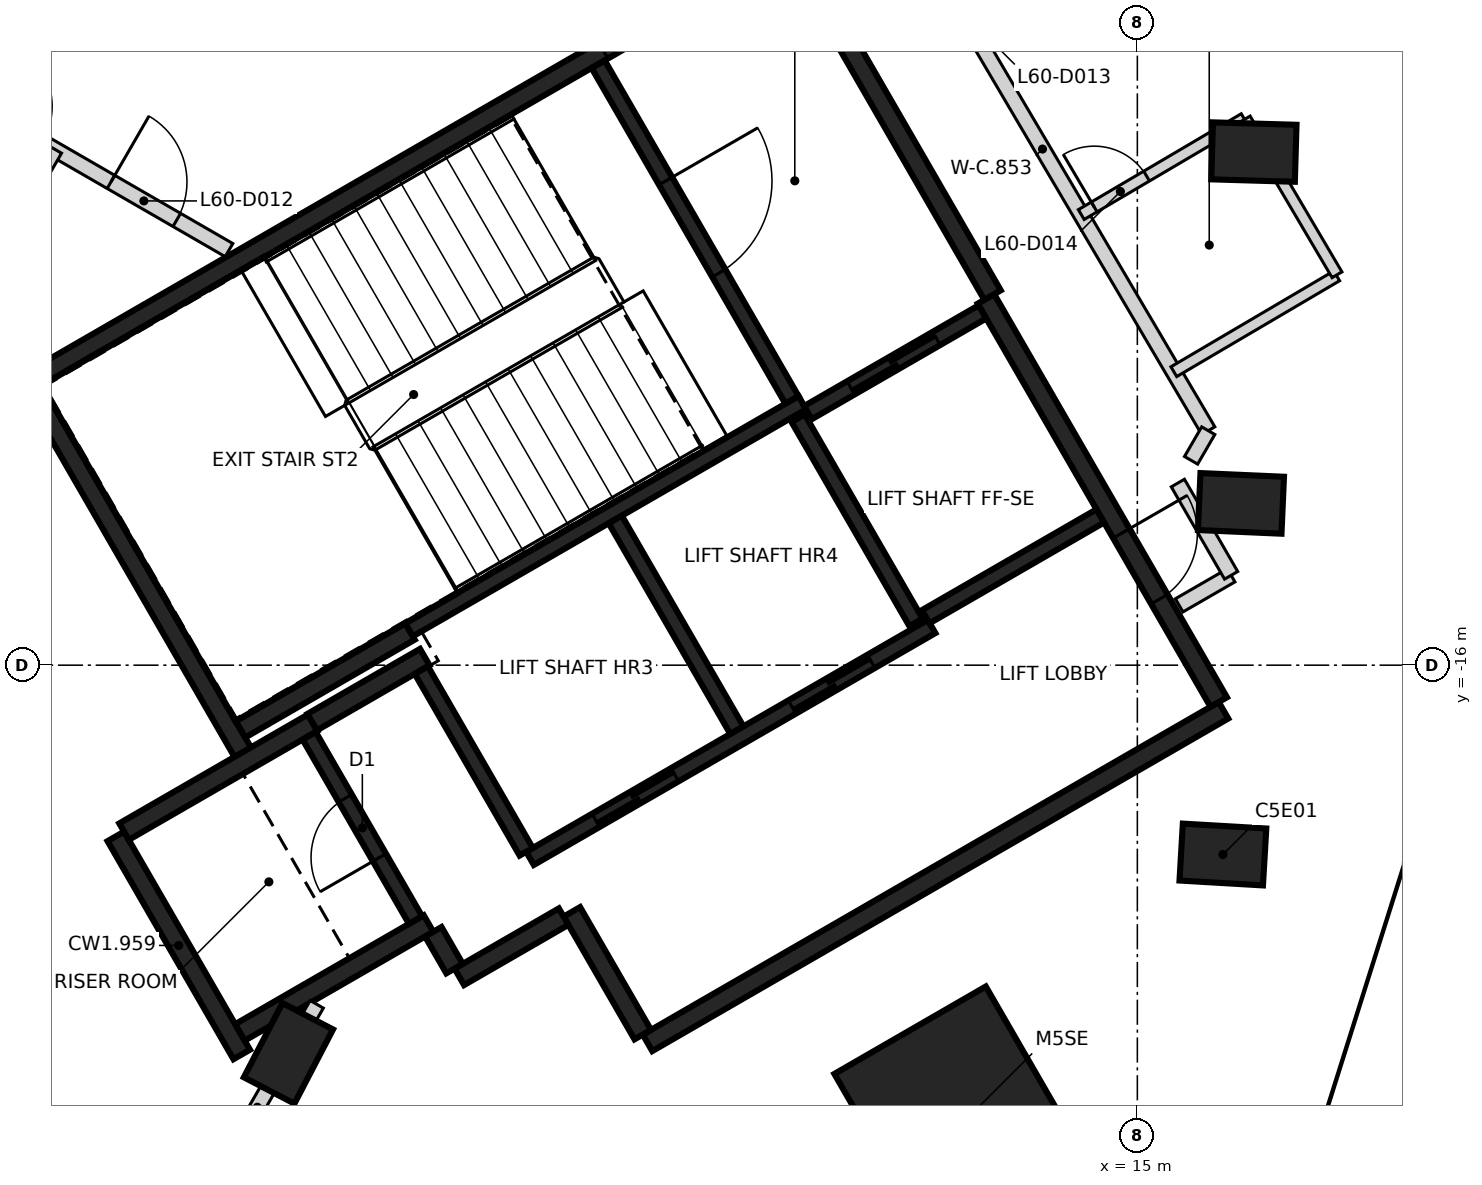
"""IFC4 building model, lengths in metres.
Left out: names, types, materials, properties, quantities, classifications, styles, units other than length and angle.
Written with IfcOpenShell. Run it as: python <this file> out.ifc"""

import sys

from ifc_helpers import new_model, si_unit, direction, frame, frame_2d, origin, origin_2d, place, context, subcontext, project, spatial, rectangle, extrude, element, fill, save


model = new_model("IFC4")
c1 = context("Model", 3, precision=1e-05, world=origin(), true_north=direction((0.0, 1.0)))
c2 = subcontext(c1, "Body", "Model", "MODEL_VIEW")
j1 = project(units=[si_unit("LENGTHUNIT", "METRE"), si_unit("PLANEANGLEUNIT", "RADIAN")], contexts=[c1])
p1 = place(None, origin())
s1 = spatial("IfcSite", under=j1, at=p1, CompositionType="ELEMENT")
p2 = place(p1, origin())
s2 = spatial("IfcBuilding", under=s1, at=p2, CompositionType="ELEMENT")
p3 = place(p2, frame((0.0, 0.0, 239.4)))
s3 = spatial("IfcBuildingStorey", under=s2, at=p3, CompositionType="ELEMENT", Elevation=239.4)
for number, where, z_axis, x_axis in (
    (1, (16.125, -18.491, -0.35), (0.0, 0.0, 1.0), (-0.998, 0.058, 0.0)),
    (2, (16.363, -13.872, -0.35), (0.0, 0.0, 1.0), (-0.999, 0.044, 0.0)),
    (3, (16.533, -9.25, -0.35), (0.0, 0.0, 1.0), (-1.0, 0.029, 0.0)),
    (4, (3.832, -21.107, -0.35), (0.0, 0.0, 1.0), (0.461, 0.887, 0.0)),
):
    element("IfcColumn", number, at=place(p3, frame(where, z_axis=z_axis, x_axis=x_axis)), inside=s3, PredefinedType="COLUMN", context=c2, shape_type="SweptSolid", body=[
        extrude(rectangle(XDim=1.1, YDim=0.75, at=origin_2d()), origin(), (0.0, 0.0, 1.0), 3.6),
    ])
p4 = place(p3, frame((12.71, -22.015, -0.35), z_axis=(0.0, 0.0, 1.0), x_axis=(-0.5, 0.866025403784, 0.0)))
e5 = element("IfcColumn", 5, at=p4, inside=s3, PredefinedType="COLUMN", context=c2, shape_type="SweptSolid", body=[
    extrude(rectangle(XDim=2.8, YDim=2.3, at=origin_2d()), origin(), (0.0, 0.0, 1.0), 3.6),
])
p5 = place(p3, frame((0.417, -12.273, 0.0), z_axis=(0.0, 0.0, 1.0), x_axis=(0.866021906294, 0.500006057782, 0.0)))
e6 = element("IfcWall", 6, at=p5, inside=s3, PredefinedType="SHEAR", context=c2, shape_type="SweptSolid", body=[
    extrude(rectangle(XDim=11.55, YDim=0.25, at=frame_2d((5.775, 0.0))), origin(), (0.0, 0.0, 1.0), 3.25),
])
p6 = place(p5, frame((10.025, 0.0, 0.0)))
e7 = element("IfcOpeningElement", 7, at=p6, cuts=e6, PredefinedType="OPENING", context=c2, shape_type="SweptSolid", body=[
    extrude(rectangle(XDim=1.2, YDim=2.1, at=frame_2d((0.6, 1.05))), frame((0.0, 0.135, 0.0), z_axis=(0.0, -1.0, 0.0), x_axis=(1.0, 0.0, 0.0)), (0.0, 0.0, 1.0), 0.27),
])
p7 = place(p5, frame((8.725, 0.0, 0.0)))
e8 = element("IfcOpeningElement", 8, at=p7, cuts=e6, PredefinedType="OPENING", context=c2, shape_type="SweptSolid", body=[
    extrude(rectangle(XDim=1.2, YDim=2.1, at=frame_2d((0.6, 1.05))), frame((0.0, 0.135, 0.0), z_axis=(0.0, -1.0, 0.0), x_axis=(1.0, 0.0, 0.0)), (0.0, 0.0, 1.0), 0.27),
])
p8 = place(p3, frame((16.133, -16.594, 0.0), z_axis=(0.0, 0.0, 1.0), x_axis=(-0.866022959057, -0.500004234368, 0.0)))
e9 = element("IfcWall", 9, at=p8, inside=s3, PredefinedType="SHEAR", context=c2, shape_type="SweptSolid", body=[
    extrude(rectangle(XDim=8.75, YDim=0.25, at=frame_2d((4.375, 0.0))), origin(), (0.0, 0.0, 1.0), 3.25),
])
p9 = place(p3, frame((13.008, -11.181, 0.0), z_axis=(0.0, 0.0, 1.0), x_axis=(0.500001955336, -0.866024274868, 0.0)))
e10 = element("IfcWall", 10, at=p9, inside=s3, PredefinedType="SHEAR", context=c2, shape_type="SweptSolid", body=[
    extrude(rectangle(XDim=6.125, YDim=0.25, at=frame_2d((3.062, 0.0))), origin(), (0.0, 0.0, 1.0), 3.25),
])
p10 = place(p9, frame((3.563, 0.0, 0.0)))
e11 = element("IfcOpeningElement", 11, at=p10, cuts=e10, PredefinedType="OPENING", context=c2, shape_type="SweptSolid", body=[
    extrude(rectangle(XDim=1.0, YDim=2.1, at=frame_2d((0.5, 1.05))), frame((0.0, 0.135, 0.0), z_axis=(0.0, -1.0, 0.0), x_axis=(1.0, 0.0, 0.0)), (0.0, 0.0, 1.0), 0.27),
])
p11 = place(p3, frame((3.235, -17.153, 0.0), z_axis=(0.0, 0.0, 1.0), x_axis=(-0.500008851346, 0.866020293397, 0.0)))
e12 = element("IfcWall", 12, at=p11, inside=s3, PredefinedType="SHEAR", context=c2, shape_type="SweptSolid", body=[
    extrude(rectangle(XDim=5.51, YDim=0.25, at=frame_2d((2.755, 0.0))), origin(), (0.0, 0.0, 1.0), 3.25),
])
p12 = place(p3, frame((10.483, -6.606, 0.0), z_axis=(0.0, 0.0, 1.0), x_axis=(0.49999885962, -0.866026062182, 0.0)))
e13 = element("IfcWall", 13, at=p12, inside=s3, PredefinedType="SHEAR", context=c2, shape_type="SweptSolid", body=[
    extrude(rectangle(XDim=5.225, YDim=0.25, at=frame_2d((2.612, 0.0))), origin(), (0.0, 0.0, 1.0), 3.25),
])
p13 = place(p3, frame((3.217, -21.122, 0.0), z_axis=(0.0, 0.0, 1.0), x_axis=(-0.499998874531, 0.866026053573, 0.0)))
e14 = element("IfcWall", 14, at=p13, inside=s3, PredefinedType="SHEAR", context=c2, shape_type="SweptSolid", body=[
    extrude(rectangle(XDim=3.313, YDim=0.25, at=frame_2d((1.656, 0.0))), origin(), (0.0, 0.0, 1.0), 3.25),
])
p14 = place(p3, frame((1.669, -18.19, 0.0), z_axis=(0.0, 0.0, 1.0), x_axis=(0.866042235819, 0.499970844928, 0.0)))
e15 = element("IfcWall", 15, at=p14, inside=s3, PredefinedType="SHEAR", context=c2, shape_type="SweptSolid", body=[
    extrude(rectangle(XDim=2.865, YDim=0.25, at=frame_2d((1.432, 0.0))), origin(), (0.0, 0.0, 1.0), 3.25),
])
p15 = place(p3, frame((5.675, -19.399, 0.0), z_axis=(0.0, 0.0, 1.0), x_axis=(-0.866026637627, -0.499997862916, 0.0)))
e16 = element("IfcWall", 16, at=p15, inside=s3, PredefinedType="SHEAR", context=c2, shape_type="SweptSolid", body=[
    extrude(rectangle(XDim=2.865, YDim=0.25, at=frame_2d((1.432, 0.0))), origin(), (0.0, 0.0, 1.0), 3.25),
])
p16 = place(p3, frame((5.431, -15.556, 0.0), z_axis=(0.0, 0.0, 1.0), x_axis=(-0.866022940537, -0.500004266446, 0.0)))
e17 = element("IfcWall", 17, at=p16, inside=s3, PredefinedType="SHEAR", context=c2, shape_type="SweptSolid", body=[
    extrude(rectangle(XDim=2.575, YDim=0.25, at=frame_2d((1.287, 0.0))), origin(), (0.0, 0.0, 1.0), 3.25),
])
p17 = place(p3, frame((8.493, -20.86, 0.0), z_axis=(0.0, 0.0, 1.0), x_axis=(-0.500039802285, 0.866002422705, 0.0)))
e18 = element("IfcWall", 18, at=p17, inside=s3, PredefinedType="SHEAR", context=c2, shape_type="SweptSolid", body=[
    extrude(rectangle(XDim=1.865, YDim=0.25, at=frame_2d((0.932, 0.0))), origin(), (0.0, 0.0, 1.0), 3.25),
])
p18 = place(p3, frame((4.145, -16.749, 0.0), z_axis=(0.0, 0.0, 1.0), x_axis=(0.866038183914, 0.499977863513, 0.0)))
e19 = element("IfcWall", 19, at=p18, inside=s3, PredefinedType="SHEAR", context=c2, shape_type="SweptSolid", body=[
    extrude(rectangle(XDim=1.71, YDim=0.25, at=frame_2d((0.855, 0.0))), origin(), (0.0, 0.0, 1.0), 3.25),
])
p19 = place(p3, frame((7.452, -19.308, 0.0), z_axis=(0.0, 0.0, 1.0), x_axis=(-0.866044474677, -0.49996696679, 0.0)))
e20 = element("IfcWall", 20, at=p19, inside=s3, PredefinedType="SHEAR", context=c2, shape_type="SweptSolid", body=[
    extrude(rectangle(XDim=1.584, YDim=0.25, at=frame_2d((0.792, 0.0))), origin(), (0.0, 0.0, 1.0), 3.25),
])
p20 = place(p3, frame((6.017, -19.992, 0.0), z_axis=(0.0, 0.0, 1.0), x_axis=(-0.500364886717, 0.865814633822, 0.0)))
e21 = element("IfcWall", 21, at=p20, inside=s3, PredefinedType="SHEAR", context=c2, shape_type="SweptSolid", body=[
    extrude(rectangle(XDim=0.559, YDim=0.25, at=frame_2d((0.28, 0.0))), origin(), (0.0, 0.0, 1.0), 3.25),
])
p21 = place(p3, frame((5.419, -15.534, 0.0), z_axis=(0.0, 0.0, 1.0), x_axis=(0.866029065029, 0.499993658486, 0.0)))
e22 = element("IfcWall", 22, at=p21, inside=s3, PredefinedType="SHEAR", context=c2, shape_type="SweptSolid", body=[
    extrude(rectangle(XDim=5.974, YDim=0.2, at=frame_2d((2.987, 0.0))), origin(), (0.0, 0.0, 1.0), 3.25),
])
p22 = place(p3, frame((7.01, -18.542, 0.0), z_axis=(0.0, 0.0, 1.0), x_axis=(0.866030299012, 0.499991521122, 0.0)))
e23 = element("IfcWall", 23, at=p22, inside=s3, PredefinedType="SHEAR", context=c2, shape_type="SweptSolid", body=[
    extrude(rectangle(XDim=6.1, YDim=0.2, at=frame_2d((3.05, 0.0))), origin(), (0.0, 0.0, 1.0), 3.25),
])
p23 = place(p22, frame((1.0, 0.0, 0.0)))
e24 = element("IfcOpeningElement", 24, at=p23, cuts=e23, PredefinedType="OPENING", context=c2, shape_type="SweptSolid", body=[
    extrude(rectangle(XDim=1.2, YDim=2.1, at=frame_2d((0.6, 1.05))), frame((0.0, 0.11, 0.0), z_axis=(0.0, -1.0, 0.0), x_axis=(1.0, 0.0, 0.0)), (0.0, 0.0, 1.0), 0.22),
])
p24 = place(p22, frame((3.982, 0.0, 0.0)))
e25 = element("IfcOpeningElement", 25, at=p24, cuts=e23, PredefinedType="OPENING", context=c2, shape_type="SweptSolid", body=[
    extrude(rectangle(XDim=1.2, YDim=2.1, at=frame_2d((0.6, 1.05))), frame((0.0, 0.11, 0.0), z_axis=(0.0, -1.0, 0.0), x_axis=(1.0, 0.0, 0.0)), (0.0, 0.0, 1.0), 0.22),
])
p25 = place(p3, frame((7.906, -8.094, 0.0), z_axis=(0.0, 0.0, 1.0), x_axis=(0.500027839223, -0.866009330205, 0.0)))
e26 = element("IfcWall", 26, at=p25, inside=s3, PredefinedType="SHEAR", context=c2, shape_type="SweptSolid", body=[
    extrude(rectangle(XDim=5.098, YDim=0.2, at=frame_2d((2.549, 0.0))), origin(), (0.0, 0.0, 1.0), 3.25),
])
p26 = place(p25, frame((1.774, 0.0, 0.0)))
e27 = element("IfcOpeningElement", 27, at=p26, cuts=e26, PredefinedType="OPENING", context=c2, shape_type="SweptSolid", body=[
    extrude(rectangle(XDim=1.4, YDim=2.1, at=frame_2d((0.7, 1.05))), frame((0.0, 0.11, 0.0), z_axis=(0.0, -1.0, 0.0), x_axis=(1.0, 0.0, 0.0)), (0.0, 0.0, 1.0), 0.22),
])
p27 = place(p3, frame((8.132, -14.084, 0.0), z_axis=(0.0, 0.0, 1.0), x_axis=(0.499997778408, -0.866026686418, 0.0)))
e28 = element("IfcWall", 28, at=p27, inside=s3, PredefinedType="SHEAR", context=c2, shape_type="SweptSolid", body=[
    extrude(rectangle(XDim=3.198, YDim=0.2, at=frame_2d((1.599, 0.0))), origin(), (0.0, 0.0, 1.0), 3.25),
])
p28 = place(p3, frame((5.503, -19.352, 0.0), z_axis=(0.0, 0.0, 1.0), x_axis=(-0.499986818241, 0.866033014143, 0.0)))
e29 = element("IfcWall", 29, at=p28, inside=s3, PredefinedType="SHEAR", context=c2, shape_type="SweptSolid", body=[
    extrude(rectangle(XDim=2.798, YDim=0.2, at=frame_2d((1.399, 0.0))), origin(), (0.0, 0.0, 1.0), 3.25),
])
p29 = place(p28, frame((0.949, 0.0, 0.0)))
e30 = element("IfcOpeningElement", 30, at=p29, cuts=e29, PredefinedType="OPENING", context=c2, shape_type="SweptSolid", body=[
    extrude(rectangle(XDim=0.9, YDim=2.1, at=frame_2d((0.45, 1.05))), frame((0.0, 0.11, 0.0), z_axis=(0.0, -1.0, 0.0), x_axis=(1.0, 0.0, 0.0)), (0.0, 0.0, 1.0), 0.22),
])
p30 = place(p3, frame((6.96, -18.455, 0.0), z_axis=(0.0, 0.0, 1.0), x_axis=(-0.499926705758, 0.866067716099, 0.0)))
e31 = element("IfcWall", 31, at=p30, inside=s3, PredefinedType="SHEAR", context=c2, shape_type="SweptSolid", body=[
    extrude(rectangle(XDim=2.759, YDim=0.2, at=frame_2d((1.38, 0.0))), origin(), (0.0, 0.0, 1.0), 3.25),
])
p31 = place(p3, frame((12.088, -15.437, 0.0), z_axis=(0.0, 0.0, 1.0), x_axis=(-0.500026960575, 0.86600983753, 0.0)))
e32 = element("IfcWall", 32, at=p31, inside=s3, PredefinedType="SHEAR", context=c2, shape_type="SweptSolid", body=[
    extrude(rectangle(XDim=3.1, YDim=0.2, at=frame_2d((1.55, 0.0))), origin(), (0.0, 0.0, 1.0), 3.25),
])
p32 = place(p3, frame((10.666, -12.678, 0.0), z_axis=(0.0, 0.0, 1.0), x_axis=(0.866018407898, 0.500012117035, 0.0)))
e33 = element("IfcWall", 33, at=p32, inside=s3, PredefinedType="SHEAR", context=c2, shape_type="SweptSolid", body=[
    extrude(rectangle(XDim=2.651, YDim=0.2, at=frame_2d((1.325, 0.0))), origin(), (0.0, 0.0, 1.0), 3.25),
])
p33 = place(p32, frame((0.652, 0.0, 0.0)))
e34 = element("IfcOpeningElement", 34, at=p33, cuts=e33, PredefinedType="OPENING", context=c2, shape_type="SweptSolid", body=[
    extrude(rectangle(XDim=1.3, YDim=2.1, at=frame_2d((0.65, 1.05))), frame((0.0, 0.11, 0.0), z_axis=(0.0, -1.0, 0.0), x_axis=(1.0, 0.0, 0.0)), (0.0, 0.0, 1.0), 0.22),
])
p34 = place(p3, frame((14.512, -14.037, 0.0), z_axis=(0.0, 0.0, 1.0), x_axis=(-0.866018407898, -0.500012117035, 0.0)))
e35 = element("IfcWall", 35, at=p34, inside=s3, PredefinedType="SHEAR", context=c2, shape_type="SweptSolid", body=[
    extrude(rectangle(XDim=2.651, YDim=0.2, at=frame_2d((1.325, 0.0))), origin(), (0.0, 0.0, 1.0), 3.25),
])
p35 = place(p3, frame((-8.153, -4.069, 0.0), z_axis=(0.0, 0.0, 1.0), x_axis=(0.865955522833, -0.500121017829, 0.0)))
e36 = element("IfcWall", 36, at=p35, inside=s3, PredefinedType="PARTITIONING", context=c2, shape_type="SweptSolid", body=[
    extrude(rectangle(XDim=12.937, YDim=0.2, at=frame_2d((6.469, 0.0))), origin(), (0.0, 0.0, 1.0), 3.25),
])
p36 = place(p35, frame((3.337, 0.0, 0.0)))
e37 = element("IfcOpeningElement", 37, at=p36, cuts=e36, PredefinedType="OPENING", context=c2, shape_type="SweptSolid", body=[
    extrude(rectangle(XDim=1.0, YDim=2.1, at=frame_2d((0.5, 1.05))), frame((0.0, 0.11, 0.0), z_axis=(0.0, -1.0, 0.0), x_axis=(1.0, 0.0, 0.0)), (0.0, 0.0, 1.0), 0.22),
])
p37 = place(p35, frame((9.153, 0.0, 0.0)))
e38 = element("IfcOpeningElement", 38, at=p37, cuts=e36, PredefinedType="OPENING", context=c2, shape_type="SweptSolid", body=[
    extrude(rectangle(XDim=0.95, YDim=2.1, at=frame_2d((0.475, 1.05))), frame((0.0, 0.11, 0.0), z_axis=(0.0, -1.0, 0.0), x_axis=(1.0, 0.0, 0.0)), (0.0, 0.0, 1.0), 0.22),
])
p38 = place(p35, frame((11.144, 0.0, 0.0)))
e39 = element("IfcOpeningElement", 39, at=p38, cuts=e36, PredefinedType="OPENING", context=c2, shape_type="SweptSolid", body=[
    extrude(rectangle(XDim=1.0, YDim=2.1, at=frame_2d((0.5, 1.05))), frame((0.0, 0.11, 0.0), z_axis=(0.0, -1.0, 0.0), x_axis=(1.0, 0.0, 0.0)), (0.0, 0.0, 1.0), 0.22),
])
p39 = place(p3, frame((11.571, -5.505, 0.0), z_axis=(0.0, 0.0, 1.0), x_axis=(0.507291838928, -0.861774326699, 0.0)))
e40 = element("IfcWall", 40, at=p39, inside=s3, PredefinedType="PARTITIONING", context=c2, shape_type="SweptSolid", body=[
    extrude(rectangle(XDim=8.599, YDim=0.2, at=frame_2d((4.299, 0.0))), origin(), (0.0, 0.0, 1.0), 3.25),
])
p40 = place(p39, frame((1.712, 0.0, 0.0)))
e41 = element("IfcOpeningElement", 41, at=p40, cuts=e40, PredefinedType="OPENING", context=c2, shape_type="SweptSolid", body=[
    extrude(rectangle(XDim=0.95, YDim=2.1, at=frame_2d((0.475, 1.05))), frame((0.0, 0.11, 0.0), z_axis=(0.0, -1.0, 0.0), x_axis=(1.0, 0.0, 0.0)), (0.0, 0.0, 1.0), 0.22),
])
p41 = place(p3, frame((15.55, -15.213, 0.0), z_axis=(0.0, 0.0, 1.0), x_axis=(0.865989998118, 0.500061319399, 0.0)))
e42 = element("IfcWall", 42, at=p41, inside=s3, PredefinedType="PARTITIONING", context=c2, shape_type="SweptSolid", body=[
    extrude(rectangle(XDim=0.79, YDim=0.2, at=frame_2d((0.395, 0.0))), origin(), (0.0, 0.0, 1.0), 2.35),
])
p42 = place(p3, frame((15.933, -12.915, 0.0), z_axis=(0.0, 0.0, 1.0), x_axis=(-0.502017930819, -0.864857211993, 0.0)))
e43 = element("IfcWall", 43, at=p42, inside=s3, PredefinedType="PARTITIONING", context=c2, shape_type="SweptSolid", body=[
    extrude(rectangle(XDim=0.451, YDim=0.2, at=frame_2d((0.226, 0.0))), origin(), (0.0, 0.0, 1.0), 3.25),
])
p43 = place(p3, frame((15.533, -13.604, 0.0), z_axis=(0.0, 0.0, 1.0), x_axis=(0.499978724804, -0.866037686676, 0.0)))
e44 = element("IfcWall", 44, at=p43, inside=s3, PredefinedType="PARTITIONING", context=c2, shape_type="SweptSolid", body=[
    extrude(rectangle(XDim=1.402, YDim=0.2, at=frame_2d((0.701, 0.0))), origin(), (0.0, 0.0, 1.0), 2.35),
])
p44 = place(p3, frame((-4.942, -19.089, 0.0), z_axis=(0.0, 0.0, 1.0), x_axis=(0.500021458202, 0.866013014531, 0.0)))
e45 = element("IfcWall", 45, at=p44, inside=s3, PredefinedType="PARTITIONING", context=c2, shape_type="SweptSolid", body=[
    extrude(rectangle(XDim=11.403, YDim=0.2, at=frame_2d((5.701, 0.0))), origin(), (0.0, 0.0, 1.0), 2.35),
])
p45 = place(p3, frame((2.64, -23.17, 0.0), z_axis=(0.0, 0.0, 1.0), x_axis=(0.500017489778, 0.866015305821, 0.0)))
e46 = element("IfcWall", 46, at=p45, inside=s3, PredefinedType="PARTITIONING", context=c2, shape_type="SweptSolid", body=[
    extrude(rectangle(XDim=3.128, YDim=0.2, at=frame_2d((1.564, 0.0))), origin(), (0.0, 0.0, 1.0), 3.25),
])
p46 = place(p3, frame((14.262, -10.072, 0.0), z_axis=(0.0, 0.0, 1.0), x_axis=(0.861699433364, 0.507419044322, 0.0)))
e47 = element("IfcWall", 47, at=p46, inside=s3, PredefinedType="PARTITIONING", context=c2, shape_type="SweptSolid", body=[
    extrude(rectangle(XDim=2.487, YDim=0.15, at=frame_2d((1.244, 0.0))), origin(), (0.0, 0.0, 1.0), 3.25),
])
p47 = place(p46, frame((0.198, 0.0, 0.0)))
e48 = element("IfcOpeningElement", 48, at=p47, cuts=e47, PredefinedType="OPENING", context=c2, shape_type="SweptSolid", body=[
    extrude(rectangle(XDim=0.8, YDim=2.1, at=frame_2d((0.4, 1.05))), frame((0.0, 0.085, 0.0), z_axis=(0.0, -1.0, 0.0), x_axis=(1.0, 0.0, 0.0)), (0.0, 0.0, 1.0), 0.17),
])
p48 = place(p3, frame((15.48, -12.139, 0.0), z_axis=(0.0, 0.0, 1.0), x_axis=(0.86187110735, 0.507127394562, 0.0)))
e49 = element("IfcWall", 49, at=p48, inside=s3, PredefinedType="PARTITIONING", context=c2, shape_type="SweptSolid", body=[
    extrude(rectangle(XDim=2.487, YDim=0.15, at=frame_2d((1.243, 0.0))), origin(), (0.0, 0.0, 1.0), 2.35),
])
p49 = place(p3, frame((16.419, -8.814, 0.0), z_axis=(0.0, 0.0, 1.0), x_axis=(0.507674628474, -0.861548879405, 0.0)))
e50 = element("IfcWall", 50, at=p49, inside=s3, PredefinedType="PARTITIONING", context=c2, shape_type="SweptSolid", body=[
    extrude(rectangle(XDim=2.379, YDim=0.15, at=frame_2d((1.19, 0.0))), origin(), (0.0, 0.0, 1.0), 3.25),
])
p50 = place(p33, origin())
e51 = element("IfcDoor", 51, at=p50, inside=s3, OperationType="SLIDING_TO_RIGHT", PredefinedType="DOOR", context=c2, shape_type="SweptSolid", body=[
    extrude(rectangle(XDim=1.3, YDim=2.1, at=frame_2d((0.65, 1.05))), frame((0.0, 0.025, 0.0), z_axis=(0.0, -1.0, 0.0), x_axis=(1.0, 0.0, 0.0)), (0.0, 0.0, 1.0), 0.05),
])
fill(e34, e51)
p51 = place(p23, origin())
e52 = element("IfcDoor", 52, at=p51, inside=s3, OperationType="DOUBLE_DOOR_SLIDING", PredefinedType="DOOR", context=c2, shape_type="SweptSolid", body=[
    extrude(rectangle(XDim=1.2, YDim=2.1, at=frame_2d((0.6, 1.05))), frame((0.0, 0.025, 0.0), z_axis=(0.0, -1.0, 0.0), x_axis=(1.0, 0.0, 0.0)), (0.0, 0.0, 1.0), 0.05),
])
fill(e24, e52)
p52 = place(p24, origin())
e53 = element("IfcDoor", 53, at=p52, inside=s3, OperationType="DOUBLE_DOOR_SLIDING", PredefinedType="DOOR", context=c2, shape_type="SweptSolid", body=[
    extrude(rectangle(XDim=1.2, YDim=2.1, at=frame_2d((0.6, 1.05))), frame((0.0, 0.025, 0.0), z_axis=(0.0, -1.0, 0.0), x_axis=(1.0, 0.0, 0.0)), (0.0, 0.0, 1.0), 0.05),
])
fill(e25, e53)
p53 = place(p10, origin())
e54 = element("IfcDoor", 54, at=p53, inside=s3, OperationType="SINGLE_SWING_LEFT", PredefinedType="DOOR", context=c2, shape_type="SweptSolid", body=[
    extrude(rectangle(XDim=1.0, YDim=2.1, at=frame_2d((0.5, 1.05))), frame((0.0, 0.025, 0.0), z_axis=(0.0, -1.0, 0.0), x_axis=(1.0, 0.0, 0.0)), (0.0, 0.0, 1.0), 0.05),
])
fill(e11, e54)
p54 = place(p26, origin())
e55 = element("IfcDoor", 55, at=p54, inside=s3, OperationType="SINGLE_SWING_RIGHT", PredefinedType="DOOR", context=c2, shape_type="SweptSolid", body=[
    extrude(rectangle(XDim=1.4, YDim=2.1, at=frame_2d((0.7, 1.05))), frame((0.0, 0.025, 0.0), z_axis=(0.0, -1.0, 0.0), x_axis=(1.0, 0.0, 0.0)), (0.0, 0.0, 1.0), 0.05),
])
fill(e27, e55)
p55 = place(p29, origin())
e56 = element("IfcDoor", 56, at=p55, inside=s3, OperationType="SINGLE_SWING_LEFT", PredefinedType="DOOR", context=c2, shape_type="SweptSolid", body=[
    extrude(rectangle(XDim=0.9, YDim=2.1, at=frame_2d((0.45, 1.05))), frame((0.0, 0.025, 0.0), z_axis=(0.0, -1.0, 0.0), x_axis=(1.0, 0.0, 0.0)), (0.0, 0.0, 1.0), 0.05),
])
fill(e30, e56)
p56 = place(p38, frame((1.0, 0.0, 0.0), z_axis=(0.0, 0.0, 1.0), x_axis=(-1.0, 0.0, 0.0)))
e57 = element("IfcDoor", 57, at=p56, inside=s3, OperationType="SINGLE_SWING_LEFT", PredefinedType="DOOR", context=c2, shape_type="SweptSolid", body=[
    extrude(rectangle(XDim=1.0, YDim=2.1, at=frame_2d((0.5, 1.05))), frame((0.0, 0.025, 0.0), z_axis=(0.0, -1.0, 0.0), x_axis=(1.0, 0.0, 0.0)), (0.0, 0.0, 1.0), 0.05),
])
fill(e39, e57)
p57 = place(p47, frame((0.8, 0.0, 0.0), z_axis=(0.0, 0.0, 1.0), x_axis=(-1.0, 0.0, 0.0)))
e58 = element("IfcDoor", 58, at=p57, inside=s3, OperationType="SINGLE_SWING_LEFT", PredefinedType="DOOR", context=c2, shape_type="SweptSolid", body=[
    extrude(rectangle(XDim=0.8, YDim=2.1, at=frame_2d((0.4, 1.05))), frame((0.0, 0.025, 0.0), z_axis=(0.0, -1.0, 0.0), x_axis=(1.0, 0.0, 0.0)), (0.0, 0.0, 1.0), 0.05),
])
fill(e48, e58)
save(model, sys.argv[1])
